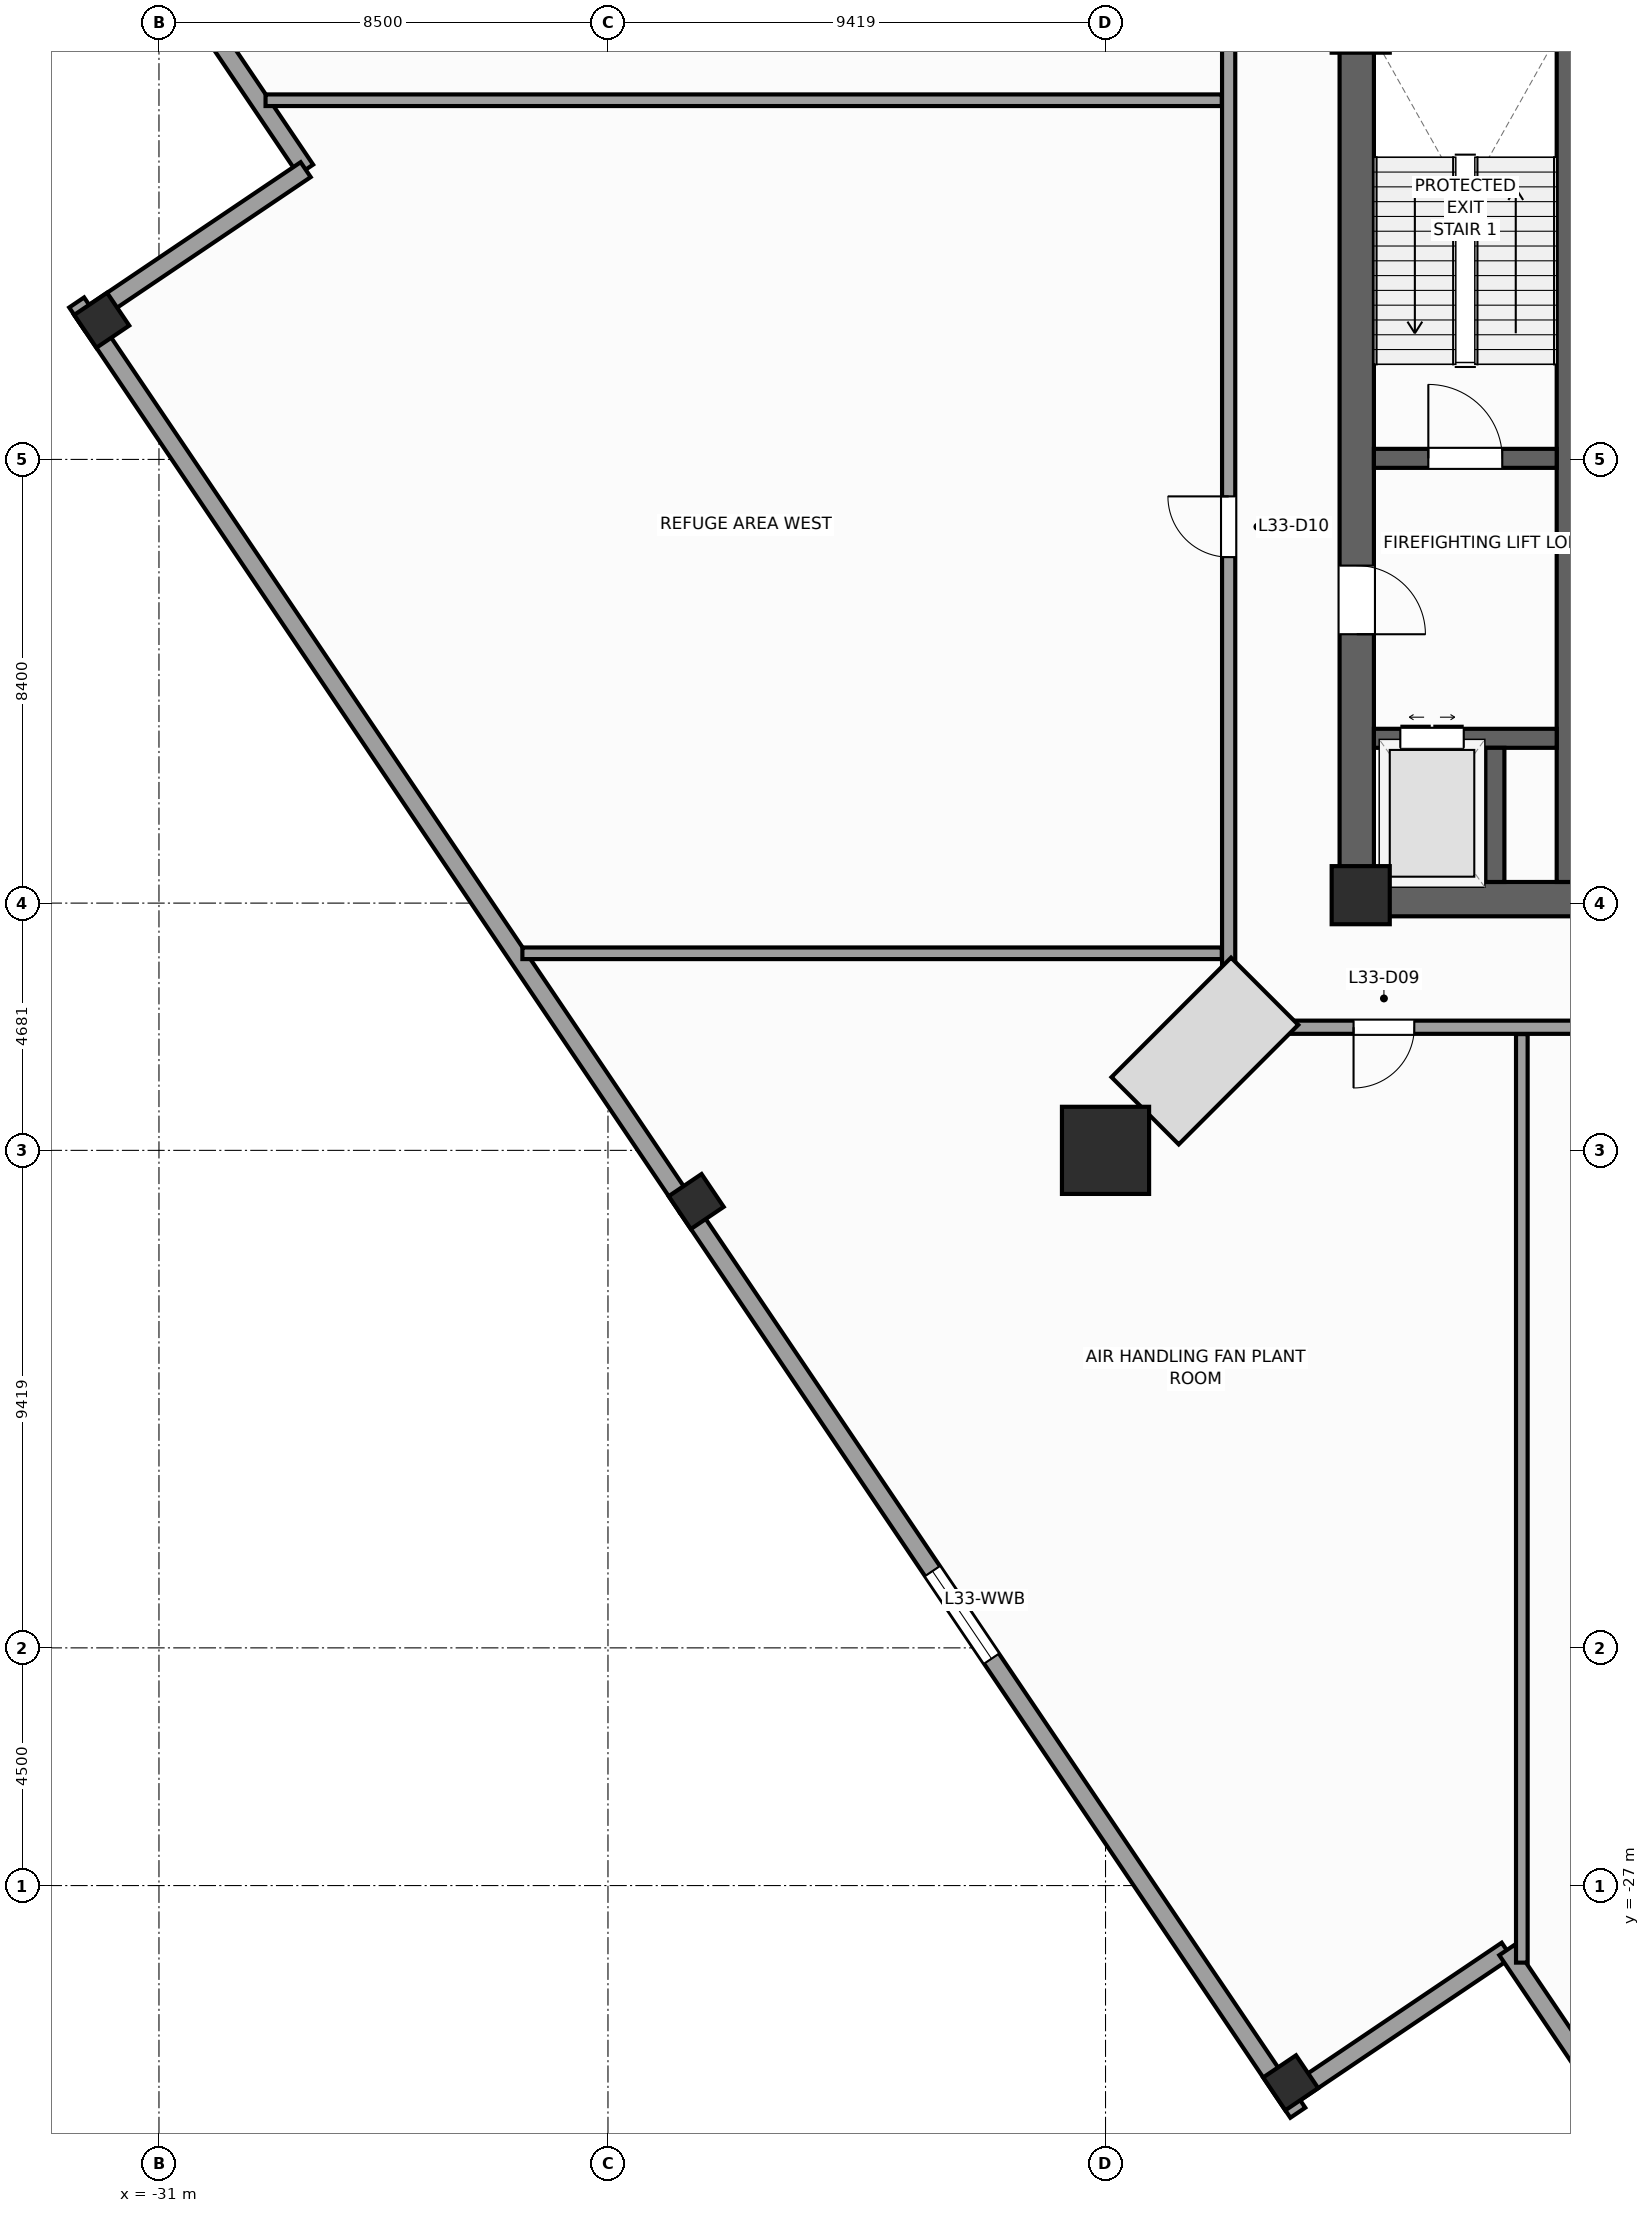
"""IFC4 building model, lengths in metres.
Left out: names, types, materials, properties, quantities, classifications, styles, units other than length and angle.
Written with IfcOpenShell. Run it as: python <this file> out.ifc"""

import sys

from ifc_helpers import new_model, si_unit, direction, frame, frame_2d, origin, origin_2d, place, context, subcontext, project, spatial, rectangle, extrude, source, transform, mapped, element, fill, save


model = new_model("IFC4")
c1 = context("Model", 3, precision=1e-05, world=origin(), true_north=direction((0.0, 1.0)))
c2 = subcontext(c1, "Body", "Model", "MODEL_VIEW")
j1 = project(units=[si_unit("LENGTHUNIT", "METRE"), si_unit("PLANEANGLEUNIT", "RADIAN")], contexts=[c1])
p1 = place(None, origin())
s1 = spatial("IfcSite", under=j1, at=p1, CompositionType="ELEMENT")
p2 = place(p1, origin())
s2 = spatial("IfcBuilding", under=s1, at=p2, CompositionType="ELEMENT")
p3 = place(p2, frame((0.0, 0.0, 139.2)))
s3 = spatial("IfcBuildingStorey", under=s2, at=p3, CompositionType="ELEMENT", Elevation=139.2)
p4 = place(p3, frame((-8.65, -8.325, 0.0), z_axis=(0.0, 0.0, 1.0), x_axis=(1.0, 0.0, 0.0)))
e1 = element("IfcWall", 1, at=p4, inside=s3, PredefinedType="SHEAR", context=c2, shape_type="SweptSolid", body=[
    extrude(rectangle(XDim=17.3, YDim=0.65, at=frame_2d((8.65, 0.0))), origin(), (0.0, 0.0, 1.0), 5.2),
])
p5 = place(p4, frame((8.0, 0.0, 0.0)))
e2 = element("IfcOpeningElement", 2, at=p5, cuts=e1, PredefinedType="OPENING", context=c2, shape_type="SweptSolid", body=[
    extrude(rectangle(XDim=1.3, YDim=2.2, at=frame_2d((0.65, 1.1))), frame((0.0, 0.335, 0.0), z_axis=(0.0, -1.0, 0.0), x_axis=(1.0, 0.0, 0.0)), (0.0, 0.0, 1.0), 0.67),
])
p6 = place(p3, frame((-8.325, -8.0, 0.0), z_axis=(0.0, 0.0, 1.0), x_axis=(0.0, 1.0, 0.0)))
e3 = element("IfcWall", 3, at=p6, inside=s3, PredefinedType="SHEAR", context=c2, shape_type="SweptSolid", body=[
    extrude(rectangle(XDim=16.0, YDim=0.65, at=frame_2d((8.0, 0.0))), origin(), (0.0, 0.0, 1.0), 5.2),
])
p7 = place(p6, frame((4.69, 0.0, 0.0)))
e4 = element("IfcOpeningElement", 4, at=p7, cuts=e3, PredefinedType="OPENING", context=c2, shape_type="SweptSolid", body=[
    extrude(rectangle(XDim=1.3, YDim=2.2, at=frame_2d((0.65, 1.1))), frame((0.0, 0.335, 0.0), z_axis=(0.0, -1.0, 0.0), x_axis=(1.0, 0.0, 0.0)), (0.0, 0.0, 1.0), 0.67),
])
p8 = place(p3, frame((-4.36, -8.0, 0.0), z_axis=(0.0, 0.0, 1.0), x_axis=(0.0, 1.0, 0.0)))
e5 = element("IfcWall", 5, at=p8, inside=s3, PredefinedType="SHEAR", context=c2, shape_type="SweptSolid", body=[
    extrude(rectangle(XDim=16.0, YDim=0.36, at=frame_2d((8.0, 0.0))), origin(), (0.0, 0.0, 1.0), 5.2),
])
p9 = place(p3, frame((-8.0, 0.02, 0.0), z_axis=(0.0, 0.0, 1.0), x_axis=(1.0, 0.0, 0.0)))
e6 = element("IfcWall", 6, at=p9, inside=s3, PredefinedType="SHEAR", context=c2, shape_type="SweptSolid", body=[
    extrude(rectangle(XDim=3.46, YDim=0.36, at=frame_2d((1.73, 0.0))), origin(), (0.0, 0.0, 1.0), 5.2),
])
p10 = place(p9, frame((1.03, 0.0, 0.0)))
e7 = element("IfcOpeningElement", 7, at=p10, cuts=e6, PredefinedType="OPENING", context=c2, shape_type="SweptSolid", body=[
    extrude(rectangle(XDim=1.4, YDim=2.2, at=frame_2d((0.7, 1.1))), frame((0.0, 0.19, 0.0), z_axis=(0.0, -1.0, 0.0), x_axis=(1.0, 0.0, 0.0)), (0.0, 0.0, 1.0), 0.38),
])
p11 = place(p3, frame((-8.0, -5.28, 0.0), z_axis=(0.0, 0.0, 1.0), x_axis=(1.0, 0.0, 0.0)))
e8 = element("IfcWall", 8, at=p11, inside=s3, PredefinedType="SHEAR", context=c2, shape_type="SweptSolid", body=[
    extrude(rectangle(XDim=3.46, YDim=0.36, at=frame_2d((1.73, 0.0))), origin(), (0.0, 0.0, 1.0), 5.2),
])
p12 = place(p11, frame((0.5, 0.0, 0.0)))
e9 = element("IfcOpeningElement", 9, at=p12, cuts=e8, PredefinedType="OPENING", context=c2, shape_type="SweptSolid", body=[
    extrude(rectangle(XDim=1.2, YDim=2.25, at=frame_2d((0.6, 1.125))), frame((0.0, 0.19, 0.0), z_axis=(0.0, -1.0, 0.0), x_axis=(1.0, 0.0, 0.0)), (0.0, 0.0, 1.0), 0.38),
])
p13 = place(p3, frame((-5.71, -8.0, 0.0), z_axis=(0.0, 0.0, 1.0), x_axis=(0.0, 1.0, 0.0)))
e10 = element("IfcWall", 10, at=p13, inside=s3, PredefinedType="SHEAR", context=c2, shape_type="SweptSolid", body=[
    extrude(rectangle(XDim=2.54, YDim=0.36, at=frame_2d((1.27, 0.0))), origin(), (0.0, 0.0, 1.0), 5.2),
])
m1 = source(origin(), c2, "Body", "SweptSolid", [
    extrude(rectangle(XDim=1.1, YDim=1.1, at=origin_2d()), origin(), (0.0, 0.0, 1.0), 5.2),
])
for number, where, z_axis, x_axis in (
    (11, (-8.25, -8.25, 0.0), (0.0, 0.0, 1.0), (1.0, 0.0, 0.0)),
    (12, (-8.25, 8.25, 0.0), (0.0, 0.0, 1.0), (1.0, 0.0, 0.0)),
):
    element("IfcColumn", number, at=place(p3, frame(where, z_axis=z_axis, x_axis=x_axis)), inside=s3, PredefinedType="PILASTER", context=c2, shape_type="MappedRepresentation", body=[
        mapped(m1, transform((0.0, 0.0, 0.0), scale=1.0)),
    ])
m2 = source(origin(), c2, "Body", "SweptSolid", [
    extrude(rectangle(XDim=1.65, YDim=1.65, at=origin_2d()), origin(), (0.0, 0.0, 1.0), 5.2),
])
p14 = place(p3, frame((-13.081, -13.081, 0.0), z_axis=(0.0, 0.0, 1.0), x_axis=(1.0, 0.0, 0.0)))
e13 = element("IfcColumn", 13, at=p14, inside=s3, PredefinedType="COLUMN", context=c2, shape_type="MappedRepresentation", body=[
    mapped(m2, transform((0.0, 0.0, 0.0), scale=1.0)),
])
m3 = source(origin(), c2, "Body", "SweptSolid", [
    extrude(rectangle(XDim=0.75, YDim=0.75, at=origin_2d()), origin(), (0.0, 0.0, 1.0), 5.2),
])
for number, where, z_axis, x_axis in (
    (14, (-32.083, 2.635, 0.0), (0.0, 0.0, 1.0), (0.829, 0.559, 0.0)),
    (15, (-20.83, -14.05, 0.0), (0.0, 0.0, 1.0), (0.829, 0.559, 0.0)),
    (16, (-9.576, -30.734, 0.0), (0.0, 0.0, 1.0), (0.829, 0.559, 0.0)),
):
    element("IfcColumn", number, at=place(p3, frame(where, z_axis=z_axis, x_axis=x_axis)), inside=s3, PredefinedType="COLUMN", context=c2, shape_type="MappedRepresentation", body=[
        mapped(m3, transform((0.0, 0.0, 0.0), scale=1.0)),
    ])
p15 = place(p3, frame((-31.019, 9.631, 0.0), z_axis=(0.0, 0.0, 1.0), x_axis=(0.559210350234, -0.829025804298, 0.0)))
e17 = element("IfcWall", 17, at=p15, inside=s3, PredefinedType="STANDARD", context=c2, shape_type="SweptSolid", body=[
    extrude(rectangle(XDim=5.0, YDim=0.34, at=frame_2d((2.5, 0.0))), origin(), (0.0, 0.0, 1.0), 4.94),
])
p16 = place(p3, frame((-28.223, 5.486, 0.0), z_axis=(0.0, 0.0, 1.0), x_axis=(-0.82905227345, -0.559171107879, 0.0)))
e18 = element("IfcWall", 18, at=p16, inside=s3, PredefinedType="STANDARD", context=c2, shape_type="SweptSolid", body=[
    extrude(rectangle(XDim=5.17, YDim=0.34, at=frame_2d((2.585, 0.0))), origin(), (0.0, 0.0, 1.0), 4.24),
])
p17 = place(p3, frame((-9.631, -31.019, 0.0), z_axis=(0.0, 0.0, 1.0), x_axis=(0.829025804298, 0.559210350234, 0.0)))
e19 = element("IfcWall", 19, at=p17, inside=s3, PredefinedType="STANDARD", context=c2, shape_type="SweptSolid", body=[
    extrude(rectangle(XDim=5.0, YDim=0.34, at=frame_2d((2.5, 0.0))), origin(), (0.0, 0.0, 1.0), 4.94),
])
p18 = place(p3, frame((-5.486, -28.223, 0.0), z_axis=(0.0, 0.0, 1.0), x_axis=(0.559171107879, -0.82905227345, 0.0)))
e20 = element("IfcWall", 20, at=p18, inside=s3, PredefinedType="STANDARD", context=c2, shape_type="SweptSolid", body=[
    extrude(rectangle(XDim=5.17, YDim=0.34, at=frame_2d((2.585, 0.0))), origin(), (0.0, 0.0, 1.0), 4.24),
])
p19 = place(p3, frame((-32.558, 2.972, 0.0), z_axis=(0.0, 0.0, 1.0), x_axis=(0.559194910251, -0.829036218961, 0.0)))
e21 = element("IfcWall", 21, at=p19, inside=s3, PredefinedType="STANDARD", context=c2, shape_type="SweptSolid", body=[
    extrude(rectangle(XDim=20.67, YDim=0.34, at=frame_2d((10.335, 0.0))), origin(), (0.0, 0.0, 1.0), 4.34),
])
p20 = place(p3, frame((-21.0, -14.164, 0.0), z_axis=(0.0, 0.0, 1.0), x_axis=(0.559194910251, -0.829036218961, 0.0)))
e22 = element("IfcWall", 22, at=p20, inside=s3, PredefinedType="STANDARD", context=c2, shape_type="SweptSolid", body=[
    extrude(rectangle(XDim=20.67, YDim=0.34, at=frame_2d((10.335, 0.0))), origin(), (0.0, 0.0, 1.0), 4.24),
])
p21 = place(p20, frame((8.302, 0.0, 0.65)))
e23 = element("IfcOpeningElement", 23, at=p21, cuts=e22, PredefinedType="OPENING", context=c2, shape_type="SweptSolid", body=[
    extrude(rectangle(XDim=2.0, YDim=1.45, at=frame_2d((1.0, 0.725))), frame((0.0, 0.18, 0.0), z_axis=(0.0, -1.0, 0.0), x_axis=(1.0, 0.0, 0.0)), (0.0, 0.0, 1.0), 0.36),
])
p22 = place(p3, frame((-10.75, -10.75, 0.0), z_axis=(0.0, 0.0, 1.0), x_axis=(1.0, 0.0, 0.0)))
e24 = element("IfcWall", 24, at=p22, inside=s3, PredefinedType="PARTITIONING", context=c2, shape_type="SweptSolid", body=[
    extrude(rectangle(XDim=21.5, YDim=0.25, at=frame_2d((10.75, 0.0))), origin(), (0.0, 0.0, 1.0), 4.94),
])
p23 = place(p22, frame((17.986, 0.0, 0.0)))
e25 = element("IfcOpeningElement", 25, at=p23, cuts=e24, PredefinedType="OPENING", context=c2, shape_type="SweptSolid", body=[
    extrude(rectangle(XDim=1.15, YDim=2.25, at=frame_2d((0.575, 1.125))), frame((0.0, 0.135, 0.0), z_axis=(0.0, -1.0, 0.0), x_axis=(1.0, 0.0, 0.0)), (0.0, 0.0, 1.0), 0.27),
])
p24 = place(p22, frame((12.775, 0.0, 0.0)))
e26 = element("IfcOpeningElement", 26, at=p24, cuts=e24, PredefinedType="OPENING", context=c2, shape_type="SweptSolid", body=[
    extrude(rectangle(XDim=1.15, YDim=2.25, at=frame_2d((0.575, 1.125))), frame((0.0, 0.135, 0.0), z_axis=(0.0, -1.0, 0.0), x_axis=(1.0, 0.0, 0.0)), (0.0, 0.0, 1.0), 0.27),
])
p25 = place(p22, frame((7.575, 0.0, 0.0)))
e27 = element("IfcOpeningElement", 27, at=p25, cuts=e24, PredefinedType="OPENING", context=c2, shape_type="SweptSolid", body=[
    extrude(rectangle(XDim=1.15, YDim=2.25, at=frame_2d((0.575, 1.125))), frame((0.0, 0.135, 0.0), z_axis=(0.0, -1.0, 0.0), x_axis=(1.0, 0.0, 0.0)), (0.0, 0.0, 1.0), 0.27),
])
p26 = place(p22, frame((2.365, 0.0, 0.0)))
e28 = element("IfcOpeningElement", 28, at=p26, cuts=e24, PredefinedType="OPENING", context=c2, shape_type="SweptSolid", body=[
    extrude(rectangle(XDim=1.15, YDim=2.25, at=frame_2d((0.575, 1.125))), frame((0.0, 0.135, 0.0), z_axis=(0.0, -1.0, 0.0), x_axis=(1.0, 0.0, 0.0)), (0.0, 0.0, 1.0), 0.27),
])
p27 = place(p3, frame((-10.75, -10.65, 0.0), z_axis=(0.0, 0.0, 1.0), x_axis=(0.0, 1.0, 0.0)))
e29 = element("IfcWall", 29, at=p27, inside=s3, PredefinedType="PARTITIONING", context=c2, shape_type="SweptSolid", body=[
    extrude(rectangle(XDim=21.3, YDim=0.25, at=frame_2d((10.65, 0.0))), origin(), (0.0, 0.0, 1.0), 4.94),
])
p28 = place(p27, frame((8.8, 0.0, 0.0)))
e30 = element("IfcOpeningElement", 30, at=p28, cuts=e29, PredefinedType="OPENING", context=c2, shape_type="SweptSolid", body=[
    extrude(rectangle(XDim=1.15, YDim=2.25, at=frame_2d((0.575, 1.125))), frame((0.0, 0.135, 0.0), z_axis=(0.0, -1.0, 0.0), x_axis=(1.0, 0.0, 0.0)), (0.0, 0.0, 1.0), 0.27),
])
p29 = place(p3, frame((-5.2, -10.88, 0.0), z_axis=(0.0, 0.0, 1.0), x_axis=(0.0, -1.0, 0.0)))
e31 = element("IfcWall", 31, at=p29, inside=s3, PredefinedType="PARTITIONING", context=c2, shape_type="SweptSolid", body=[
    extrude(rectangle(XDim=17.579, YDim=0.22, at=frame_2d((8.79, 0.0))), origin(), (0.0, 0.0, 1.0), 4.94),
])
p30 = place(p3, frame((-10.88, -9.35, 0.0), z_axis=(0.0, 0.0, 1.0), x_axis=(-1.0, 0.0, 0.0)))
e32 = element("IfcWall", 32, at=p30, inside=s3, PredefinedType="PARTITIONING", context=c2, shape_type="SweptSolid", body=[
    extrude(rectangle(XDim=13.24, YDim=0.22, at=frame_2d((6.62, 0.0))), origin(), (0.0, 0.0, 1.0), 4.94),
])
p31 = place(p3, frame((-10.88, 6.8, 0.0), z_axis=(0.0, 0.0, 1.0), x_axis=(-1.0, 0.0, 0.0)))
e33 = element("IfcWall", 33, at=p31, inside=s3, PredefinedType="PARTITIONING", context=c2, shape_type="SweptSolid", body=[
    extrude(rectangle(XDim=18.103, YDim=0.22, at=frame_2d((9.051, 0.0))), origin(), (0.0, 0.0, 1.0), 4.94),
])
m4 = source(origin(), c2, "Body", "SweptSolid", [
    extrude(rectangle(XDim=2.0, YDim=1.45, at=frame_2d((1.0, 0.725))), frame((0.0, 0.03, 0.0), z_axis=(0.0, -1.0, 0.0), x_axis=(1.0, 0.0, 0.0)), (0.0, 0.0, 1.0), 0.06),
])
p32 = place(p21, origin())
e34 = element("IfcWindow", 34, at=p32, inside=s3, PartitioningType="SINGLE_PANEL", PredefinedType="WINDOW", context=c2, shape_type="MappedRepresentation", body=[
    mapped(m4, transform((0.0, 0.0, 0.0), scale=1.0)),
])
fill(e23, e34)
m5 = source(origin(), c2, "Body", "SweptSolid", [
    extrude(rectangle(XDim=1.4, YDim=2.2, at=frame_2d((0.7, 1.1))), frame((0.0, 0.025, 0.0), z_axis=(0.0, -1.0, 0.0), x_axis=(1.0, 0.0, 0.0)), (0.0, 0.0, 1.0), 0.05),
])
p33 = place(p10, origin())
e35 = element("IfcDoor", 35, at=p33, inside=s3, OperationType="SINGLE_SWING_LEFT", PredefinedType="DOOR", context=c2, shape_type="MappedRepresentation", body=[
    mapped(m5, transform((0.0, 0.0, 0.0), scale=1.0)),
])
fill(e7, e35)
m6 = source(origin(), c2, "Body", "SweptSolid", [
    extrude(rectangle(XDim=1.3, YDim=2.2, at=frame_2d((0.65, 1.1))), frame((0.0, 0.025, 0.0), z_axis=(0.0, -1.0, 0.0), x_axis=(1.0, 0.0, 0.0)), (0.0, 0.0, 1.0), 0.05),
])
p34 = place(p7, frame((1.3, 0.0, 0.0), z_axis=(0.0, 0.0, 1.0), x_axis=(-1.0, 0.0, 0.0)))
e36 = element("IfcDoor", 36, at=p34, inside=s3, OperationType="SINGLE_SWING_LEFT", PredefinedType="DOOR", context=c2, shape_type="MappedRepresentation", body=[
    mapped(m6, transform((0.0, 0.0, 0.0), scale=1.0)),
])
fill(e4, e36)
m7 = source(origin(), c2, "Body", "SweptSolid", [
    extrude(rectangle(XDim=1.2, YDim=2.25, at=frame_2d((0.6, 1.125))), frame((0.0, 0.025, 0.0), z_axis=(0.0, -1.0, 0.0), x_axis=(1.0, 0.0, 0.0)), (0.0, 0.0, 1.0), 0.05),
])
p35 = place(p12, origin())
e37 = element("IfcDoor", 37, at=p35, inside=s3, OperationType="DOUBLE_DOOR_SLIDING", PredefinedType="DOOR", context=c2, shape_type="MappedRepresentation", body=[
    mapped(m7, transform((0.0, 0.0, 0.0), scale=1.0)),
])
fill(e9, e37)
m8 = source(origin(), c2, "Body", "SweptSolid", [
    extrude(rectangle(XDim=1.15, YDim=2.25, at=frame_2d((0.575, 1.125))), frame((0.0, 0.025, 0.0), z_axis=(0.0, -1.0, 0.0), x_axis=(1.0, 0.0, 0.0)), (0.0, 0.0, 1.0), 0.05),
])
p36 = place(p26, frame((1.15, 0.0, 0.0), z_axis=(0.0, 0.0, 1.0), x_axis=(-1.0, 0.0, 0.0)))
e38 = element("IfcDoor", 38, at=p36, inside=s3, OperationType="SINGLE_SWING_LEFT", PredefinedType="DOOR", context=c2, shape_type="MappedRepresentation", body=[
    mapped(m8, transform((0.0, 0.0, 0.0), scale=1.0)),
])
fill(e28, e38)
p37 = place(p28, origin())
e39 = element("IfcDoor", 39, at=p37, inside=s3, OperationType="SINGLE_SWING_RIGHT", PredefinedType="DOOR", context=c2, shape_type="MappedRepresentation", body=[
    mapped(m8, transform((0.0, 0.0, 0.0), scale=1.0)),
])
fill(e30, e39)
save(model, sys.argv[1])
